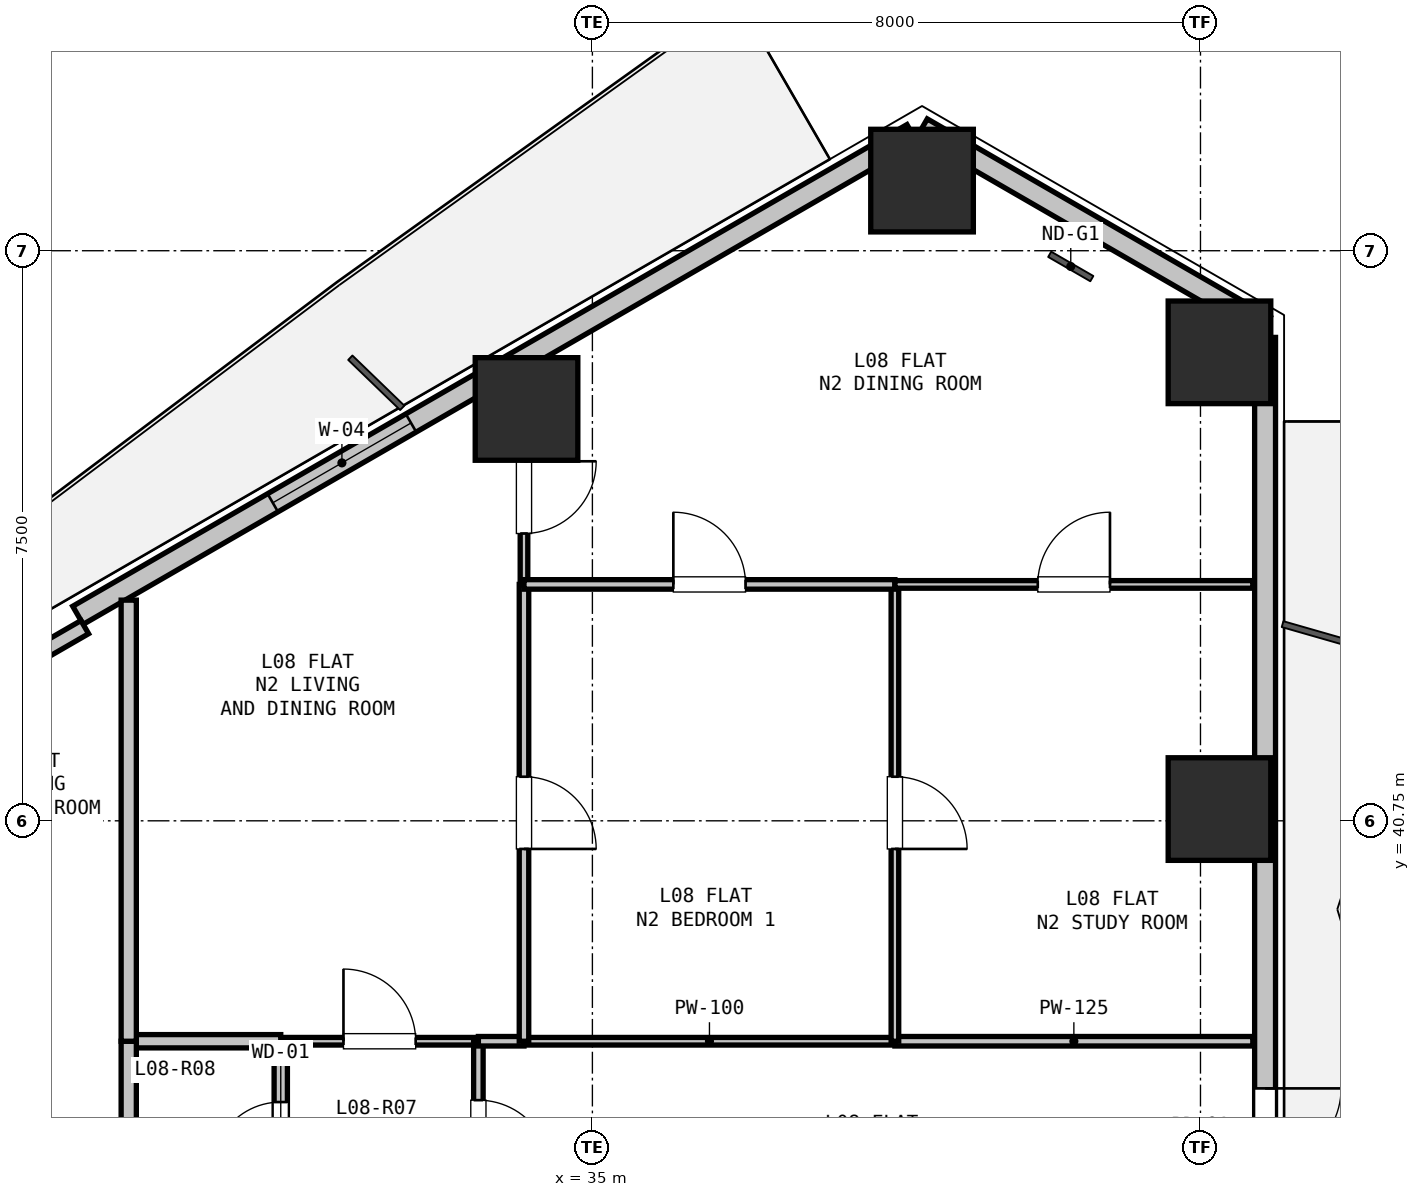
"""IFC4 building model, lengths in metres.
Left out: names, types, materials, properties, quantities, classifications, styles, units other than length and angle.
Written with IfcOpenShell. Run it as: python <this file> out.ifc"""

import sys

from ifc_helpers import new_model, si_unit, direction, frame, frame_2d, origin, origin_2d, place, context, subcontext, project, spatial, rectangle, hollow_rectangle, extrude, element, fill, save


model = new_model("IFC4")
c1 = context("Model", 3, precision=1e-05, world=origin(), true_north=direction((0.0, 1.0)))
c2 = subcontext(c1, "Body", "Model", "MODEL_VIEW")
j1 = project(units=[si_unit("LENGTHUNIT", "METRE"), si_unit("PLANEANGLEUNIT", "RADIAN")], contexts=[c1])
p1 = place(None, origin())
s1 = spatial("IfcSite", under=j1, at=p1, CompositionType="ELEMENT")
p2 = place(p1, origin())
s2 = spatial("IfcBuilding", under=s1, at=p2, CompositionType="ELEMENT")
p3 = place(p2, frame((0.0, 0.0, 32.4)))
s3 = spatial("IfcBuildingStorey", under=s2, at=p3, CompositionType="ELEMENT", Elevation=32.4)
for number, where, z_axis, x_axis in (
    (1, (34.133, 46.168, 0.0), (0.0, 0.0, 1.0), (1.0, 0.0, 0.0)),
    (2, (39.337, 49.173, 0.0), (0.0, 0.0, 1.0), (1.0, 0.0, 0.0)),
    (3, (43.25, 46.913, 0.0), (0.0, 0.0, 1.0), (1.0, 0.0, 0.0)),
    (4, (43.25, 40.905, 0.0), (0.0, 0.0, 1.0), (1.0, 0.0, 0.0)),
):
    element("IfcColumn", number, at=place(p3, frame(where, z_axis=z_axis, x_axis=x_axis)), inside=s3, PredefinedType="COLUMN", context=c2, shape_type="SweptSolid", body=[
        extrude(hollow_rectangle(XDim=1.35, YDim=1.35, WallThickness=0.036, at=origin_2d()), origin(), (0.0, 0.0, 1.0), 3.3),
    ])
p4 = place(p3, frame((39.337, 49.865, 0.0), z_axis=(0.0, 0.0, 1.0), x_axis=(0.866043601342, -0.499968479581, 0.0)))
e5 = element("IfcWall", 5, at=p4, inside=s3, PredefinedType="SOLIDWALL", context=c2, shape_type="SweptSolid", body=[
    extrude(rectangle(XDim=5.211, YDim=0.275, at=frame_2d((2.605, 0.0))), origin(), (0.0, 0.0, 1.0), 2.66),
])
p5 = place(p3, frame((28.232, 43.454, 0.0), z_axis=(0.0, 0.0, 1.0), x_axis=(0.86603192154, 0.499988710747, 0.0)))
e6 = element("IfcWall", 6, at=p5, inside=s3, PredefinedType="SOLIDWALL", context=c2, shape_type="SweptSolid", body=[
    extrude(rectangle(XDim=12.673, YDim=0.275, at=frame_2d((6.336, 0.0))), origin(), (0.0, 0.0, 1.0), 2.66),
])
p6 = place(p5, frame((2.96, 0.0, 0.9)))
e7 = element("IfcOpeningElement", 7, at=p6, cuts=e6, PredefinedType="OPENING", context=c2, shape_type="SweptSolid", body=[
    extrude(rectangle(XDim=2.1, YDim=1.6, at=frame_2d((1.05, 0.8))), frame((0.0, 0.147, 0.0), z_axis=(0.0, -1.0, 0.0), x_axis=(1.0, 0.0, 0.0)), (0.0, 0.0, 1.0), 0.295),
])
p7 = place(p3, frame((26.85, 42.448, 0.0), z_axis=(0.0, 0.0, 1.0), x_axis=(0.86605165483, 0.499954529098, 0.0)))
e8 = element("IfcWall", 8, at=p7, inside=s3, PredefinedType="PARAPET", context=c2, shape_type="SweptSolid", body=[
    extrude(rectangle(XDim=1.7, YDim=0.2, at=frame_2d((0.85, 0.0))), origin(), (0.0, 0.0, 1.0), 2.66),
])
p8 = place(p3, frame((43.85, 47.11, 0.0), z_axis=(0.0, 0.0, 1.0), x_axis=(0.0, -1.0, 0.0)))
e9 = element("IfcWall", 9, at=p8, inside=s3, PredefinedType="SOLIDWALL", context=c2, shape_type="SweptSolid", body=[
    extrude(rectangle(XDim=12.673, YDim=0.275, at=frame_2d((6.336, 0.0))), origin(), (0.0, 0.0, 1.0), 2.66),
])
p9 = place(p8, frame((9.88, 0.0, 0.0)))
e10 = element("IfcOpeningElement", 10, at=p9, cuts=e9, PredefinedType="OPENING", context=c2, shape_type="SweptSolid", body=[
    extrude(rectangle(XDim=1.0, YDim=2.1, at=frame_2d((0.5, 1.05))), frame((0.0, 0.147, 0.0), z_axis=(0.0, -1.0, 0.0), x_axis=(1.0, 0.0, 0.0)), (0.0, 0.0, 1.0), 0.295),
])
p10 = place(p3, frame((30.9, 37.85, 0.0), z_axis=(0.0, 0.0, 1.0), x_axis=(1.0, 0.0, 0.0)))
e11 = element("IfcWall", 11, at=p10, inside=s3, PredefinedType="PARTITIONING", context=c2, shape_type="SweptSolid", body=[
    extrude(rectangle(XDim=2.6, YDim=0.1, at=frame_2d((1.3, 0.0))), origin(), (0.0, 0.0, 1.0), 3.04),
])
p11 = place(p10, frame((0.825, 0.0, 0.0)))
e12 = element("IfcOpeningElement", 12, at=p11, cuts=e11, PredefinedType="OPENING", context=c2, shape_type="SweptSolid", body=[
    extrude(rectangle(XDim=0.95, YDim=2.1, at=frame_2d((0.475, 1.05))), frame((0.0, 0.06, 0.0), z_axis=(0.0, -1.0, 0.0), x_axis=(1.0, 0.0, 0.0)), (0.0, 0.0, 1.0), 0.12),
])
p12 = place(p3, frame((33.5, 37.85, 0.0), z_axis=(0.0, 0.0, 1.0), x_axis=(0.0, -1.0, 0.0)))
e13 = element("IfcWall", 13, at=p12, inside=s3, PredefinedType="PARTITIONING", context=c2, shape_type="SweptSolid", body=[
    extrude(rectangle(XDim=2.5, YDim=0.125, at=frame_2d((1.25, 0.0))), origin(), (0.0, 0.0, 1.0), 3.04),
])
p13 = place(p12, frame((0.775, 0.0, 0.0)))
e14 = element("IfcOpeningElement", 14, at=p13, cuts=e13, PredefinedType="OPENING", context=c2, shape_type="SweptSolid", body=[
    extrude(rectangle(XDim=0.95, YDim=2.1, at=frame_2d((0.475, 1.05))), frame((0.0, 0.073, 0.0), z_axis=(0.0, -1.0, 0.0), x_axis=(1.0, 0.0, 0.0)), (0.0, 0.0, 1.0), 0.145),
])
p14 = place(p3, frame((30.9, 35.35, 0.0), z_axis=(0.0, 0.0, 1.0), x_axis=(0.0, 1.0, 0.0)))
e15 = element("IfcWall", 15, at=p14, inside=s3, PredefinedType="PLUMBINGWALL", context=c2, shape_type="SweptSolid", body=[
    extrude(rectangle(XDim=2.5, YDim=0.175, at=frame_2d((1.25, 0.0))), origin(), (0.0, 0.0, 1.0), 3.04),
])
p15 = place(p14, frame((0.8, 0.0, 0.0)))
e16 = element("IfcOpeningElement", 16, at=p15, cuts=e15, PredefinedType="OPENING", context=c2, shape_type="SweptSolid", body=[
    extrude(rectangle(XDim=0.9, YDim=2.1, at=frame_2d((0.45, 1.05))), frame((0.0, 0.097, 0.0), z_axis=(0.0, -1.0, 0.0), x_axis=(1.0, 0.0, 0.0)), (0.0, 0.0, 1.0), 0.195),
])
p16 = place(p3, frame((28.9, 37.85, 0.0), z_axis=(0.0, 0.0, 1.0), x_axis=(1.0, 0.0, 0.0)))
e17 = element("IfcWall", 17, at=p16, inside=s3, PredefinedType="PLUMBINGWALL", context=c2, shape_type="SweptSolid", body=[
    extrude(rectangle(XDim=2.0, YDim=0.175, at=frame_2d((1.0, 0.0))), origin(), (0.0, 0.0, 1.0), 3.04),
])
p17 = place(p3, frame((28.9, 35.35, 0.0), z_axis=(0.0, 0.0, 1.0), x_axis=(0.0, 1.0, 0.0)))
e18 = element("IfcWall", 18, at=p17, inside=s3, PredefinedType="PARTITIONING", context=c2, shape_type="SweptSolid", body=[
    extrude(rectangle(XDim=2.5, YDim=0.2, at=frame_2d((1.25, 0.0))), origin(), (0.0, 0.0, 1.0), 3.04),
])
p18 = place(p3, frame((33.5, 37.85, 0.0), z_axis=(0.0, 0.0, 1.0), x_axis=(1.0, 0.0, 0.0)))
e19 = element("IfcWall", 19, at=p18, inside=s3, PredefinedType="PARTITIONING", context=c2, shape_type="SweptSolid", body=[
    extrude(rectangle(XDim=0.6, YDim=0.125, at=frame_2d((0.3, 0.0))), origin(), (0.0, 0.0, 1.0), 3.04),
])
p19 = place(p3, frame((34.1, 37.85, 0.0), z_axis=(0.0, 0.0, 1.0), x_axis=(1.0, 0.0, 0.0)))
e20 = element("IfcWall", 20, at=p19, inside=s3, PredefinedType="PARTITIONING", context=c2, shape_type="SweptSolid", body=[
    extrude(rectangle(XDim=4.88, YDim=0.1, at=frame_2d((2.44, 0.0))), origin(), (0.0, 0.0, 1.0), 2.338),
])
p20 = place(p3, frame((38.98, 37.85, 0.0), z_axis=(0.0, 0.0, 1.0), x_axis=(1.0, 0.0, 0.0)))
e21 = element("IfcWall", 21, at=p20, inside=s3, PredefinedType="PARTITIONING", context=c2, shape_type="SweptSolid", body=[
    extrude(rectangle(XDim=4.708, YDim=0.125, at=frame_2d((2.354, 0.0))), origin(), (0.0, 0.0, 1.0), 2.338),
])
p21 = place(p3, frame((28.9, 43.653, 0.0), z_axis=(0.0, 0.0, 1.0), x_axis=(0.0, -1.0, 0.0)))
e22 = element("IfcWall", 22, at=p21, inside=s3, PredefinedType="PARTITIONING", context=c2, shape_type="SweptSolid", body=[
    extrude(rectangle(XDim=5.803, YDim=0.2, at=frame_2d((2.901, 0.0))), origin(), (0.0, 0.0, 1.0), 2.365),
])
p22 = place(p3, frame((34.1, 46.655, 0.0), z_axis=(0.0, 0.0, 1.0), x_axis=(0.0, -1.0, 0.0)))
e23 = element("IfcWall", 23, at=p22, inside=s3, PredefinedType="PARTITIONING", context=c2, shape_type="SweptSolid", body=[
    extrude(rectangle(XDim=2.795, YDim=0.1, at=frame_2d((1.397, 0.0))), origin(), (0.0, 0.0, 1.0), 3.04),
])
p23 = place(p22, frame((1.175, 0.0, 0.0)))
e24 = element("IfcOpeningElement", 24, at=p23, cuts=e23, PredefinedType="OPENING", context=c2, shape_type="SweptSolid", body=[
    extrude(rectangle(XDim=0.95, YDim=2.1, at=frame_2d((0.475, 1.05))), frame((0.0, 0.06, 0.0), z_axis=(0.0, -1.0, 0.0), x_axis=(1.0, 0.0, 0.0)), (0.0, 0.0, 1.0), 0.12),
])
p24 = place(p3, frame((34.1, 43.86, 0.0), z_axis=(0.0, 0.0, 1.0), x_axis=(0.0, -1.0, 0.0)))
e25 = element("IfcWall", 25, at=p24, inside=s3, PredefinedType="PARTITIONING", context=c2, shape_type="SweptSolid", body=[
    extrude(rectangle(XDim=6.01, YDim=0.125, at=frame_2d((3.005, 0.0))), origin(), (0.0, 0.0, 1.0), 3.04),
])
p25 = place(p24, frame((2.53, 0.0, 0.0)))
e26 = element("IfcOpeningElement", 26, at=p25, cuts=e25, PredefinedType="OPENING", context=c2, shape_type="SweptSolid", body=[
    extrude(rectangle(XDim=0.95, YDim=2.1, at=frame_2d((0.475, 1.05))), frame((0.0, 0.073, 0.0), z_axis=(0.0, -1.0, 0.0), x_axis=(1.0, 0.0, 0.0)), (0.0, 0.0, 1.0), 0.145),
])
p26 = place(p3, frame((38.98, 43.86, 0.0), z_axis=(0.0, 0.0, 1.0), x_axis=(0.0, -1.0, 0.0)))
e27 = element("IfcWall", 27, at=p26, inside=s3, PredefinedType="PARTITIONING", context=c2, shape_type="SweptSolid", body=[
    extrude(rectangle(XDim=6.01, YDim=0.1, at=frame_2d((3.005, 0.0))), origin(), (0.0, 0.0, 1.0), 3.04),
])
p27 = place(p26, frame((2.53, 0.0, 0.0)))
e28 = element("IfcOpeningElement", 28, at=p27, cuts=e27, PredefinedType="OPENING", context=c2, shape_type="SweptSolid", body=[
    extrude(rectangle(XDim=0.95, YDim=2.1, at=frame_2d((0.475, 1.05))), frame((0.0, 0.06, 0.0), z_axis=(0.0, -1.0, 0.0), x_axis=(1.0, 0.0, 0.0)), (0.0, 0.0, 1.0), 0.12),
])
p28 = place(p3, frame((34.1, 43.86, 0.0), z_axis=(0.0, 0.0, 1.0), x_axis=(1.0, 0.0, 0.0)))
e29 = element("IfcWall", 29, at=p28, inside=s3, PredefinedType="PARTITIONING", context=c2, shape_type="SweptSolid", body=[
    extrude(rectangle(XDim=4.88, YDim=0.125, at=frame_2d((2.44, 0.0))), origin(), (0.0, 0.0, 1.0), 2.338),
])
p29 = place(p28, frame((1.965, 0.0, 0.0)))
e30 = element("IfcOpeningElement", 30, at=p29, cuts=e29, PredefinedType="OPENING", context=c2, shape_type="SweptSolid", body=[
    extrude(rectangle(XDim=0.95, YDim=2.1, at=frame_2d((0.475, 1.05))), frame((0.0, 0.073, 0.0), z_axis=(0.0, -1.0, 0.0), x_axis=(1.0, 0.0, 0.0)), (0.0, 0.0, 1.0), 0.145),
])
p30 = place(p3, frame((38.98, 43.86, 0.0), z_axis=(0.0, 0.0, 1.0), x_axis=(1.0, 0.0, 0.0)))
e31 = element("IfcWall", 31, at=p30, inside=s3, PredefinedType="PARTITIONING", context=c2, shape_type="SweptSolid", body=[
    extrude(rectangle(XDim=4.708, YDim=0.1, at=frame_2d((2.354, 0.0))), origin(), (0.0, 0.0, 1.0), 2.65),
])
p31 = place(p30, frame((1.879, 0.0, 0.0)))
e32 = element("IfcOpeningElement", 32, at=p31, cuts=e31, PredefinedType="OPENING", context=c2, shape_type="SweptSolid", body=[
    extrude(rectangle(XDim=0.95, YDim=2.1, at=frame_2d((0.475, 1.05))), frame((0.0, 0.06, 0.0), z_axis=(0.0, -1.0, 0.0), x_axis=(1.0, 0.0, 0.0)), (0.0, 0.0, 1.0), 0.12),
])
p32 = place(p6, origin())
e33 = element("IfcWindow", 33, at=p32, inside=s3, PartitioningType="SINGLE_PANEL", PredefinedType="WINDOW", context=c2, shape_type="SweptSolid", body=[
    extrude(rectangle(XDim=2.1, YDim=1.6, at=frame_2d((1.05, 0.8))), frame((0.0, 0.03, 0.0), z_axis=(0.0, -1.0, 0.0), x_axis=(1.0, 0.0, 0.0)), (0.0, 0.0, 1.0), 0.06),
])
fill(e7, e33)
p33 = place(p9, origin())
e34 = element("IfcDoor", 34, at=p33, inside=s3, OperationType="SINGLE_SWING_LEFT", PredefinedType="DOOR", context=c2, shape_type="SweptSolid", body=[
    extrude(rectangle(XDim=1.0, YDim=2.1, at=frame_2d((0.5, 1.05))), frame((0.0, 0.025, 0.0), z_axis=(0.0, -1.0, 0.0), x_axis=(1.0, 0.0, 0.0)), (0.0, 0.0, 1.0), 0.05),
])
fill(e10, e34)
p34 = place(p15, origin())
e35 = element("IfcDoor", 35, at=p34, inside=s3, OperationType="SINGLE_SWING_LEFT", PredefinedType="DOOR", context=c2, shape_type="SweptSolid", body=[
    extrude(rectangle(XDim=0.9, YDim=2.1, at=frame_2d((0.45, 1.05))), frame((0.0, 0.025, 0.0), z_axis=(0.0, -1.0, 0.0), x_axis=(1.0, 0.0, 0.0)), (0.0, 0.0, 1.0), 0.05),
])
fill(e16, e35)
p35 = place(p13, origin())
e36 = element("IfcDoor", 36, at=p35, inside=s3, OperationType="SINGLE_SWING_RIGHT", PredefinedType="DOOR", context=c2, shape_type="SweptSolid", body=[
    extrude(rectangle(XDim=0.95, YDim=2.1, at=frame_2d((0.475, 1.05))), frame((0.0, 0.025, 0.0), z_axis=(0.0, -1.0, 0.0), x_axis=(1.0, 0.0, 0.0)), (0.0, 0.0, 1.0), 0.05),
])
fill(e14, e36)
p36 = place(p11, origin())
e37 = element("IfcDoor", 37, at=p36, inside=s3, OperationType="SINGLE_SWING_LEFT", PredefinedType="DOOR", context=c2, shape_type="SweptSolid", body=[
    extrude(rectangle(XDim=0.95, YDim=2.1, at=frame_2d((0.475, 1.05))), frame((0.0, 0.025, 0.0), z_axis=(0.0, -1.0, 0.0), x_axis=(1.0, 0.0, 0.0)), (0.0, 0.0, 1.0), 0.05),
])
fill(e12, e37)
p37 = place(p25, origin())
e38 = element("IfcDoor", 38, at=p37, inside=s3, OperationType="SINGLE_SWING_RIGHT", PredefinedType="DOOR", context=c2, shape_type="SweptSolid", body=[
    extrude(rectangle(XDim=0.95, YDim=2.1, at=frame_2d((0.475, 1.05))), frame((0.0, 0.025, 0.0), z_axis=(0.0, -1.0, 0.0), x_axis=(1.0, 0.0, 0.0)), (0.0, 0.0, 1.0), 0.05),
])
fill(e26, e38)
p38 = place(p23, origin())
e39 = element("IfcDoor", 39, at=p38, inside=s3, OperationType="SINGLE_SWING_LEFT", PredefinedType="DOOR", context=c2, shape_type="SweptSolid", body=[
    extrude(rectangle(XDim=0.95, YDim=2.1, at=frame_2d((0.475, 1.05))), frame((0.0, 0.025, 0.0), z_axis=(0.0, -1.0, 0.0), x_axis=(1.0, 0.0, 0.0)), (0.0, 0.0, 1.0), 0.05),
])
fill(e24, e39)
p39 = place(p27, origin())
e40 = element("IfcDoor", 40, at=p39, inside=s3, OperationType="SINGLE_SWING_RIGHT", PredefinedType="DOOR", context=c2, shape_type="SweptSolid", body=[
    extrude(rectangle(XDim=0.95, YDim=2.1, at=frame_2d((0.475, 1.05))), frame((0.0, 0.025, 0.0), z_axis=(0.0, -1.0, 0.0), x_axis=(1.0, 0.0, 0.0)), (0.0, 0.0, 1.0), 0.05),
])
fill(e28, e40)
p40 = place(p29, origin())
e41 = element("IfcDoor", 41, at=p40, inside=s3, OperationType="SINGLE_SWING_LEFT", PredefinedType="DOOR", context=c2, shape_type="SweptSolid", body=[
    extrude(rectangle(XDim=0.95, YDim=2.1, at=frame_2d((0.475, 1.05))), frame((0.0, 0.025, 0.0), z_axis=(0.0, -1.0, 0.0), x_axis=(1.0, 0.0, 0.0)), (0.0, 0.0, 1.0), 0.05),
])
fill(e30, e41)
p41 = place(p31, origin())
e42 = element("IfcDoor", 42, at=p41, inside=s3, OperationType="SINGLE_SWING_RIGHT", PredefinedType="DOOR", context=c2, shape_type="SweptSolid", body=[
    extrude(rectangle(XDim=0.95, YDim=2.1, at=frame_2d((0.475, 1.05))), frame((0.0, 0.025, 0.0), z_axis=(0.0, -1.0, 0.0), x_axis=(1.0, 0.0, 0.0)), (0.0, 0.0, 1.0), 0.05),
])
fill(e32, e42)
save(model, sys.argv[1])
